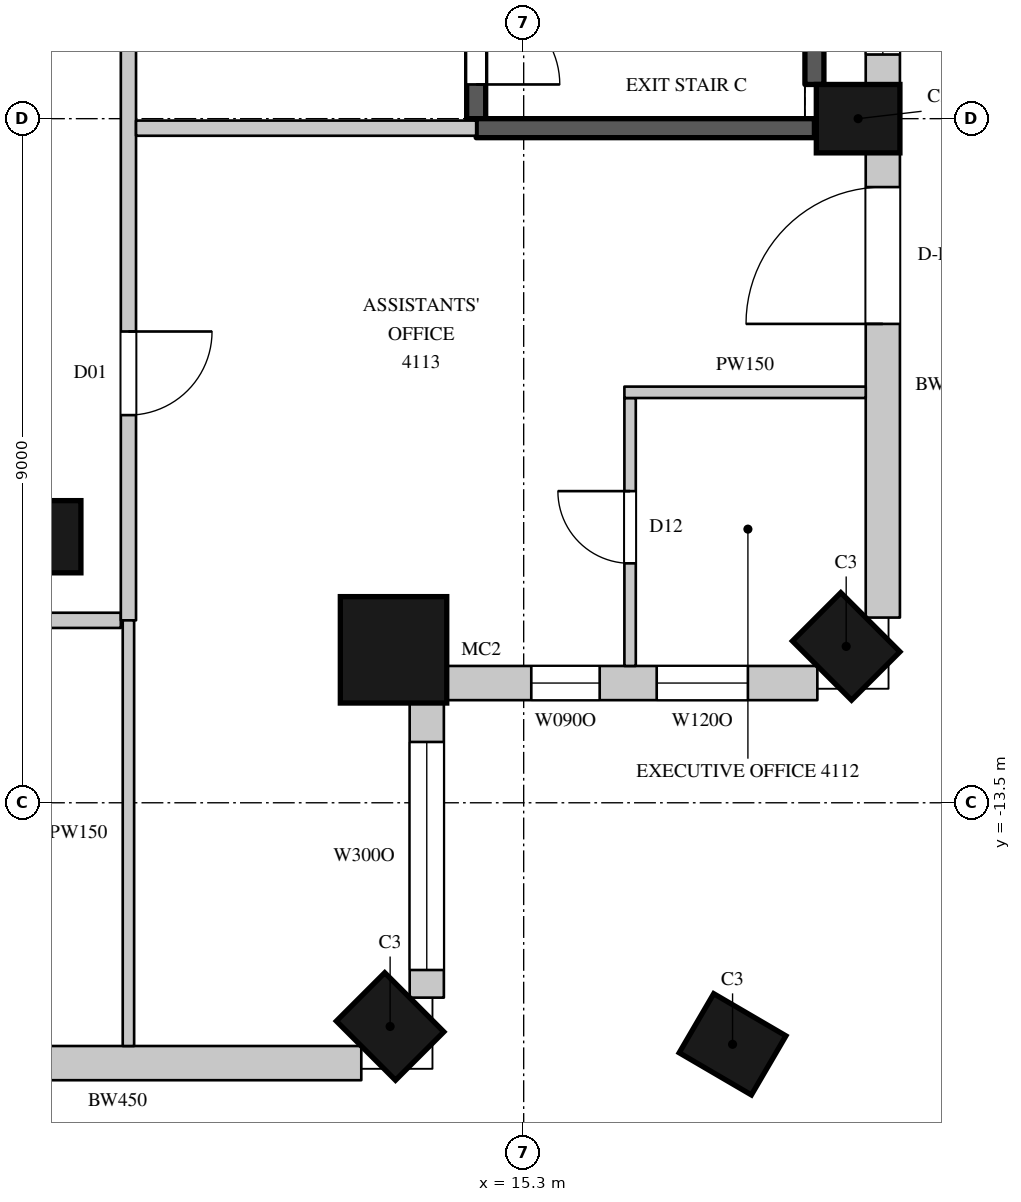
"""IFC4 building model, lengths in metres.
Left out: names, types, materials, properties, quantities, classifications, styles, units other than length and angle.
Written with IfcOpenShell. Run it as: python <this file> out.ifc"""

import sys

from ifc_helpers import new_model, si_unit, direction, frame, frame_2d, origin, origin_2d, place, context, subcontext, project, spatial, rectangle, circle, extrude, element, fill, save


model = new_model("IFC4")
c1 = context("Model", 3, precision=1e-05, world=origin(), true_north=direction((0.0, 1.0)))
c2 = subcontext(c1, "Body", "Model", "MODEL_VIEW")
j1 = project(units=[si_unit("LENGTHUNIT", "METRE"), si_unit("PLANEANGLEUNIT", "RADIAN")], contexts=[c1])
p1 = place(None, origin())
s1 = spatial("IfcSite", under=j1, at=p1, CompositionType="ELEMENT")
p2 = place(p1, origin())
s2 = spatial("IfcBuilding", under=s1, at=p2, CompositionType="ELEMENT")
p3 = place(p2, frame((0.0, 0.0, 189.2)))
s3 = spatial("IfcBuildingStorey", under=s2, at=p3, CompositionType="ELEMENT", Elevation=189.2)
p4 = place(p3, frame((13.543, -16.443, 0.0), z_axis=(0.0, 0.0, 1.0), x_axis=(0.707106781187, 0.707106781187, 0.0)))
e1 = element("IfcColumn", 1, at=p4, inside=s3, PredefinedType="COLUMN", context=c2, shape_type="SweptSolid", body=[
    extrude(rectangle(XDim=0.9, YDim=1.1, at=origin_2d()), origin(), (0.0, 0.0, 1.0), 4.1),
])
p5 = place(p3, frame((13.588, -11.488, 0.0), z_axis=(0.0, 0.0, 1.0), x_axis=(1.0, 0.0, 0.0)))
e2 = element("IfcColumn", 2, at=p5, inside=s3, PredefinedType="COLUMN", context=c2, shape_type="SweptSolid", body=[
    extrude(circle(Radius=0.7, at=origin_2d()), origin(), (0.0, 0.0, 1.0), 4.1),
])
for number, where, z_axis, x_axis in (
    (3, (19.543, -11.443, 0.0), (0.0, 0.0, 1.0), (0.707, 0.707, 0.0)),
    (4, (19.7, -4.5, 0.0), (0.0, 0.0, 1.0), (0.0, 1.0, 0.0)),
    (5, (18.048, -16.677, 0.0), (0.0, 0.0, 1.0), (0.504, 0.863, 0.0)),
):
    element("IfcColumn", number, at=place(p3, frame(where, z_axis=z_axis, x_axis=x_axis)), inside=s3, PredefinedType="COLUMN", context=c2, shape_type="SweptSolid", body=[
        extrude(rectangle(XDim=0.9, YDim=1.1, at=origin_2d()), origin(), (0.0, 0.0, 1.0), 4.1),
    ])
p6 = place(p3, frame((9.0, -10.0, 0.0), z_axis=(0.0, 0.0, 1.0), x_axis=(1.0, 0.0, 0.0)))
e6 = element("IfcColumn", 6, at=p6, inside=s3, PredefinedType="COLUMN", context=c2, shape_type="SweptSolid", body=[
    extrude(circle(Radius=0.475, at=origin_2d()), origin(), (0.0, 0.0, 1.0), 4.1),
])
p7 = place(p3, frame((6.75, -16.925, 0.0), z_axis=(0.0, 0.0, 1.0), x_axis=(1.0, 0.0, 0.0)))
e7 = element("IfcWall", 7, at=p7, inside=s3, PredefinedType="SOLIDWALL", context=c2, shape_type="SweptSolid", body=[
    extrude(rectangle(XDim=6.414, YDim=0.45, at=frame_2d((3.207, 0.0))), origin(), (0.0, 0.0, 1.0), 3.8),
])
p8 = place(p7, frame((0.525, 0.0, 0.0)))
e8 = element("IfcOpeningElement", 8, at=p8, cuts=e7, PredefinedType="OPENING", context=c2, shape_type="SweptSolid", body=[
    extrude(rectangle(XDim=1.8, YDim=2.4, at=frame_2d((0.9, 1.2))), frame((0.0, 0.235, 0.0), z_axis=(0.0, -1.0, 0.0), x_axis=(1.0, 0.0, 0.0)), (0.0, 0.0, 1.0), 0.47),
])
p9 = place(p3, frame((14.025, -16.064, 0.0), z_axis=(0.0, 0.0, 1.0), x_axis=(0.0, 1.0, 0.0)))
e9 = element("IfcWall", 9, at=p9, inside=s3, PredefinedType="SOLIDWALL", context=c2, shape_type="SweptSolid", body=[
    extrude(rectangle(XDim=3.909, YDim=0.45, at=frame_2d((1.955, 0.0))), origin(), (0.0, 0.0, 1.0), 3.8),
])
p10 = place(p9, frame((0.364, 0.0, 1.05)))
e10 = element("IfcOpeningElement", 10, at=p10, cuts=e9, PredefinedType="OPENING", context=c2, shape_type="SweptSolid", body=[
    extrude(rectangle(XDim=3.0, YDim=2.4, at=frame_2d((1.5, 1.2))), frame((0.0, 0.235, 0.0), z_axis=(0.0, -1.0, 0.0), x_axis=(1.0, 0.0, 0.0)), (0.0, 0.0, 1.0), 0.47),
])
p11 = place(p3, frame((14.255, -11.925, 0.0), z_axis=(0.0, 0.0, 1.0), x_axis=(1.0, 0.0, 0.0)))
e11 = element("IfcWall", 11, at=p11, inside=s3, PredefinedType="SOLIDWALL", context=c2, shape_type="SweptSolid", body=[
    extrude(rectangle(XDim=4.909, YDim=0.45, at=frame_2d((2.455, 0.0))), origin(), (0.0, 0.0, 1.0), 3.8),
])
p12 = place(p11, frame((1.146, 0.0, 1.05)))
e12 = element("IfcOpeningElement", 12, at=p12, cuts=e11, PredefinedType="OPENING", context=c2, shape_type="SweptSolid", body=[
    extrude(rectangle(XDim=0.9, YDim=2.4, at=frame_2d((0.45, 1.2))), frame((0.0, 0.235, 0.0), z_axis=(0.0, -1.0, 0.0), x_axis=(1.0, 0.0, 0.0)), (0.0, 0.0, 1.0), 0.47),
])
p13 = place(p11, frame((2.795, 0.0, 1.05)))
e13 = element("IfcOpeningElement", 13, at=p13, cuts=e11, PredefinedType="OPENING", context=c2, shape_type="SweptSolid", body=[
    extrude(rectangle(XDim=1.2, YDim=2.4, at=frame_2d((0.6, 1.2))), frame((0.0, 0.235, 0.0), z_axis=(0.0, -1.0, 0.0), x_axis=(1.0, 0.0, 0.0)), (0.0, 0.0, 1.0), 0.47),
])
p14 = place(p3, frame((20.025, -11.064, 0.0), z_axis=(0.0, 0.0, 1.0), x_axis=(0.0, 1.0, 0.0)))
e14 = element("IfcWall", 14, at=p14, inside=s3, PredefinedType="SOLIDWALL", context=c2, shape_type="SweptSolid", body=[
    extrude(rectangle(XDim=6.114, YDim=0.45, at=frame_2d((3.057, 0.0))), origin(), (0.0, 0.0, 1.0), 3.8),
])
p15 = place(p14, frame((3.864, 0.0, 0.0)))
e15 = element("IfcOpeningElement", 15, at=p15, cuts=e14, PredefinedType="OPENING", context=c2, shape_type="SweptSolid", body=[
    extrude(rectangle(XDim=1.8, YDim=2.4, at=frame_2d((0.9, 1.2))), frame((0.0, 0.235, 0.0), z_axis=(0.0, -1.0, 0.0), x_axis=(1.0, 0.0, 0.0)), (0.0, 0.0, 1.0), 0.47),
])
p16 = place(p3, frame((20.025, -4.05, 0.0), z_axis=(0.0, 0.0, 1.0), x_axis=(0.0, 1.0, 0.0)))
e16 = element("IfcWall", 16, at=p16, inside=s3, PredefinedType="SOLIDWALL", context=c2, shape_type="SweptSolid", body=[
    extrude(rectangle(XDim=8.439, YDim=0.45, at=frame_2d((4.219, 0.0))), origin(), (0.0, 0.0, 1.0), 3.8),
])
p17 = place(p16, frame((0.394, 0.0, 1.05)))
e17 = element("IfcOpeningElement", 17, at=p17, cuts=e16, PredefinedType="OPENING", context=c2, shape_type="SweptSolid", body=[
    extrude(rectangle(XDim=3.0, YDim=2.4, at=frame_2d((1.5, 1.2))), frame((0.0, 0.235, 0.0), z_axis=(0.0, -1.0, 0.0), x_axis=(1.0, 0.0, 0.0)), (0.0, 0.0, 1.0), 0.47),
])
p18 = place(p16, frame((5.082, 0.0, 1.05)))
e18 = element("IfcOpeningElement", 18, at=p18, cuts=e16, PredefinedType="OPENING", context=c2, shape_type="SweptSolid", body=[
    extrude(rectangle(XDim=3.0, YDim=2.4, at=frame_2d((1.5, 1.2))), frame((0.0, 0.235, 0.0), z_axis=(0.0, -1.0, 0.0), x_axis=(1.0, 0.0, 0.0)), (0.0, 0.0, 1.0), 0.47),
])
p19 = place(p3, frame((-10.9, -11.1, 0.0), z_axis=(0.0, 0.0, 1.0), x_axis=(1.0, 0.0, 0.0)))
e19 = element("IfcWall", 19, at=p19, inside=s3, PredefinedType="PARTITIONING", context=c2, shape_type="SweptSolid", body=[
    extrude(rectangle(XDim=20.9, YDim=0.2, at=frame_2d((10.45, 0.0))), origin(), (0.0, 0.0, 1.0), 3.8),
])
p20 = place(p19, frame((1.1, 0.0, 0.0)))
e20 = element("IfcOpeningElement", 20, at=p20, cuts=e19, PredefinedType="OPENING", context=c2, shape_type="SweptSolid", body=[
    extrude(rectangle(XDim=0.9, YDim=2.2, at=frame_2d((0.45, 1.1))), frame((0.0, 0.11, 0.0), z_axis=(0.0, -1.0, 0.0), x_axis=(1.0, 0.0, 0.0)), (0.0, 0.0, 1.0), 0.22),
])
p21 = place(p19, frame((4.9, 0.0, 0.0)))
e21 = element("IfcOpeningElement", 21, at=p21, cuts=e19, PredefinedType="OPENING", context=c2, shape_type="SweptSolid", body=[
    extrude(rectangle(XDim=0.9, YDim=2.2, at=frame_2d((0.45, 1.1))), frame((0.0, 0.11, 0.0), z_axis=(0.0, -1.0, 0.0), x_axis=(1.0, 0.0, 0.0)), (0.0, 0.0, 1.0), 0.22),
])
p22 = place(p19, frame((7.25, 0.0, 0.0)))
e22 = element("IfcOpeningElement", 22, at=p22, cuts=e19, PredefinedType="OPENING", context=c2, shape_type="SweptSolid", body=[
    extrude(rectangle(XDim=0.9, YDim=2.2, at=frame_2d((0.45, 1.1))), frame((0.0, 0.11, 0.0), z_axis=(0.0, -1.0, 0.0), x_axis=(1.0, 0.0, 0.0)), (0.0, 0.0, 1.0), 0.22),
])
p23 = place(p19, frame((9.95, 0.0, 0.0)))
e23 = element("IfcOpeningElement", 23, at=p23, cuts=e19, PredefinedType="OPENING", context=c2, shape_type="SweptSolid", body=[
    extrude(rectangle(XDim=1.1, YDim=2.4, at=frame_2d((0.55, 1.2))), frame((0.0, 0.11, 0.0), z_axis=(0.0, -1.0, 0.0), x_axis=(1.0, 0.0, 0.0)), (0.0, 0.0, 1.0), 0.22),
])
p24 = place(p19, frame((16.3, 0.0, 0.0)))
e24 = element("IfcOpeningElement", 24, at=p24, cuts=e19, PredefinedType="OPENING", context=c2, shape_type="SweptSolid", body=[
    extrude(rectangle(XDim=1.1, YDim=2.4, at=frame_2d((0.55, 1.2))), frame((0.0, 0.11, 0.0), z_axis=(0.0, -1.0, 0.0), x_axis=(1.0, 0.0, 0.0)), (0.0, 0.0, 1.0), 0.22),
])
p25 = place(p3, frame((10.1, -11.1, 0.0), z_axis=(0.0, 0.0, 1.0), x_axis=(0.0, 1.0, 0.0)))
e25 = element("IfcWall", 25, at=p25, inside=s3, PredefinedType="PARTITIONING", context=c2, shape_type="SweptSolid", body=[
    extrude(rectangle(XDim=23.2, YDim=0.2, at=frame_2d((11.6, 0.0))), origin(), (0.0, 0.0, 1.0), 3.8),
])
p26 = place(p25, frame((8.0, 0.0, 0.0)))
e26 = element("IfcOpeningElement", 26, at=p26, cuts=e25, PredefinedType="OPENING", context=c2, shape_type="SweptSolid", body=[
    extrude(rectangle(XDim=1.5, YDim=2.4, at=frame_2d((0.75, 1.2))), frame((0.0, 0.11, 0.0), z_axis=(0.0, -1.0, 0.0), x_axis=(1.0, 0.0, 0.0)), (0.0, 0.0, 1.0), 0.22),
])
p27 = place(p25, frame((18.95, 0.0, 0.0)))
e27 = element("IfcOpeningElement", 27, at=p27, cuts=e25, PredefinedType="OPENING", context=c2, shape_type="SweptSolid", body=[
    extrude(rectangle(XDim=1.1, YDim=2.4, at=frame_2d((0.55, 1.2))), frame((0.0, 0.11, 0.0), z_axis=(0.0, -1.0, 0.0), x_axis=(1.0, 0.0, 0.0)), (0.0, 0.0, 1.0), 0.22),
])
p28 = place(p25, frame((2.7, 0.0, 0.0)))
e28 = element("IfcOpeningElement", 28, at=p28, cuts=e25, PredefinedType="OPENING", context=c2, shape_type="SweptSolid", body=[
    extrude(rectangle(XDim=1.1, YDim=2.4, at=frame_2d((0.55, 1.2))), frame((0.0, 0.11, 0.0), z_axis=(0.0, -1.0, 0.0), x_axis=(1.0, 0.0, 0.0)), (0.0, 0.0, 1.0), 0.22),
])
p29 = place(p3, frame((10.2, -4.625, 0.0), z_axis=(0.0, 0.0, 1.0), x_axis=(1.0, 0.0, 0.0)))
e29 = element("IfcWall", 29, at=p29, inside=s3, PredefinedType="PARTITIONING", context=c2, shape_type="SweptSolid", body=[
    extrude(rectangle(XDim=4.475, YDim=0.2, at=frame_2d((2.238, 0.0))), origin(), (0.0, 0.0, 1.0), 3.8),
])
p30 = place(p3, frame((10.1, -16.7, 0.0), z_axis=(0.0, 0.0, 1.0), x_axis=(0.0, 1.0, 0.0)))
e30 = element("IfcWall", 30, at=p30, inside=s3, PredefinedType="PARTITIONING", context=c2, shape_type="SweptSolid", body=[
    extrude(rectangle(XDim=5.6, YDim=0.15, at=frame_2d((2.8, 0.0))), origin(), (0.0, 0.0, 1.0), 3.8),
])
p31 = place(p3, frame((16.7, -11.7, 0.0), z_axis=(0.0, 0.0, 1.0), x_axis=(0.0, 1.0, 0.0)))
e31 = element("IfcWall", 31, at=p31, inside=s3, PredefinedType="PARTITIONING", context=c2, shape_type="SweptSolid", body=[
    extrude(rectangle(XDim=3.525, YDim=0.15, at=frame_2d((1.762, 0.0))), origin(), (0.0, 0.0, 1.0), 3.8),
])
p32 = place(p31, frame((1.35, 0.0, 0.0)))
e32 = element("IfcOpeningElement", 32, at=p32, cuts=e31, PredefinedType="OPENING", context=c2, shape_type="SweptSolid", body=[
    extrude(rectangle(XDim=0.95, YDim=2.2, at=frame_2d((0.475, 1.1))), frame((0.0, 0.085, 0.0), z_axis=(0.0, -1.0, 0.0), x_axis=(1.0, 0.0, 0.0)), (0.0, 0.0, 1.0), 0.17),
])
p33 = place(p3, frame((16.625, -8.1, 0.0), z_axis=(0.0, 0.0, 1.0), x_axis=(1.0, 0.0, 0.0)))
e33 = element("IfcWall", 33, at=p33, inside=s3, PredefinedType="PARTITIONING", context=c2, shape_type="SweptSolid", body=[
    extrude(rectangle(XDim=3.175, YDim=0.15, at=frame_2d((1.587, 0.0))), origin(), (0.0, 0.0, 1.0), 3.15),
])
p34 = place(p3, frame((14.675, -4.5, 0.0), z_axis=(0.0, 0.0, 1.0), x_axis=(0.0, 1.0, 0.0)))
e34 = element("IfcWall", 34, at=p34, inside=s3, PredefinedType="SHEAR", context=c2, shape_type="SweptSolid", body=[
    extrude(rectangle(XDim=9.0, YDim=0.25, at=frame_2d((4.5, 0.0))), origin(), (0.0, 0.0, 1.0), 3.8),
])
p35 = place(p34, frame((0.45, 0.0, 0.0)))
e35 = element("IfcOpeningElement", 35, at=p35, cuts=e34, PredefinedType="OPENING", context=c2, shape_type="SweptSolid", body=[
    extrude(rectangle(XDim=1.1, YDim=2.2, at=frame_2d((0.55, 1.1))), frame((0.0, 0.135, 0.0), z_axis=(0.0, -1.0, 0.0), x_axis=(1.0, 0.0, 0.0)), (0.0, 0.0, 1.0), 0.27),
])
p36 = place(p3, frame((14.675, -4.625, 0.0), z_axis=(0.0, 0.0, 1.0), x_axis=(1.0, 0.0, 0.0)))
e36 = element("IfcWall", 36, at=p36, inside=s3, PredefinedType="SHEAR", context=c2, shape_type="SweptSolid", body=[
    extrude(rectangle(XDim=4.45, YDim=0.25, at=frame_2d((2.225, 0.0))), origin(), (0.0, 0.0, 1.0), 3.8),
])
p37 = place(p3, frame((19.125, -4.05, 0.0), z_axis=(0.0, 0.0, 1.0), x_axis=(0.0, 1.0, 0.0)))
e37 = element("IfcWall", 37, at=p37, inside=s3, PredefinedType="SHEAR", context=c2, shape_type="SweptSolid", body=[
    extrude(rectangle(XDim=8.477, YDim=0.25, at=frame_2d((4.238, 0.0))), origin(), (0.0, 0.0, 1.0), 3.8),
])
p38 = place(p10, origin())
e38 = element("IfcWindow", 38, at=p38, inside=s3, PartitioningType="SINGLE_PANEL", PredefinedType="WINDOW", context=c2, shape_type="SweptSolid", body=[
    extrude(rectangle(XDim=3.0, YDim=2.4, at=frame_2d((1.5, 1.2))), frame((0.0, 0.135, 0.0), z_axis=(0.0, -1.0, 0.0), x_axis=(1.0, 0.0, 0.0)), (0.0, 0.0, 1.0), 0.06),
])
fill(e10, e38)
p39 = place(p15, origin())
e39 = element("IfcDoor", 39, at=p39, inside=s3, OperationType="SLIDING_TO_LEFT", PredefinedType="DOOR", context=c2, shape_type="SweptSolid", body=[
    extrude(rectangle(XDim=1.8, YDim=2.4, at=frame_2d((0.9, 1.2))), frame((0.0, 0.13, 0.0), z_axis=(0.0, -1.0, 0.0), x_axis=(1.0, 0.0, 0.0)), (0.0, 0.0, 1.0), 0.05),
])
fill(e15, e39)
p40 = place(p17, origin())
e40 = element("IfcWindow", 40, at=p40, inside=s3, PartitioningType="SINGLE_PANEL", PredefinedType="WINDOW", context=c2, shape_type="SweptSolid", body=[
    extrude(rectangle(XDim=3.0, YDim=2.4, at=frame_2d((1.5, 1.2))), frame((0.0, 0.135, 0.0), z_axis=(0.0, -1.0, 0.0), x_axis=(1.0, 0.0, 0.0)), (0.0, 0.0, 1.0), 0.06),
])
fill(e17, e40)
p41 = place(p28, origin())
e41 = element("IfcDoor", 41, at=p41, inside=s3, OperationType="SINGLE_SWING_LEFT", PredefinedType="DOOR", context=c2, shape_type="SweptSolid", body=[
    extrude(rectangle(XDim=1.1, YDim=2.4, at=frame_2d((0.55, 1.2))), frame((0.0, 0.025, 0.0), z_axis=(0.0, -1.0, 0.0), x_axis=(1.0, 0.0, 0.0)), (0.0, 0.0, 1.0), 0.05),
])
fill(e28, e41)
p42 = place(p32, origin())
e42 = element("IfcDoor", 42, at=p42, inside=s3, OperationType="SINGLE_SWING_RIGHT", PredefinedType="DOOR", context=c2, shape_type="SweptSolid", body=[
    extrude(rectangle(XDim=0.95, YDim=2.2, at=frame_2d((0.475, 1.1))), frame((0.0, 0.025, 0.0), z_axis=(0.0, -1.0, 0.0), x_axis=(1.0, 0.0, 0.0)), (0.0, 0.0, 1.0), 0.05),
])
fill(e32, e42)
p43 = place(p35, origin())
e43 = element("IfcDoor", 43, at=p43, inside=s3, OperationType="SINGLE_SWING_RIGHT", PredefinedType="DOOR", context=c2, shape_type="SweptSolid", body=[
    extrude(rectangle(XDim=1.1, YDim=2.2, at=frame_2d((0.55, 1.1))), frame((0.0, 0.025, 0.0), z_axis=(0.0, -1.0, 0.0), x_axis=(1.0, 0.0, 0.0)), (0.0, 0.0, 1.0), 0.05),
])
fill(e35, e43)
p44 = place(p12, origin())
e44 = element("IfcWindow", 44, at=p44, inside=s3, PartitioningType="SINGLE_PANEL", PredefinedType="WINDOW", context=c2, shape_type="SweptSolid", body=[
    extrude(rectangle(XDim=0.9, YDim=2.4, at=frame_2d((0.45, 1.2))), frame((0.0, 0.135, 0.0), z_axis=(0.0, -1.0, 0.0), x_axis=(1.0, 0.0, 0.0)), (0.0, 0.0, 1.0), 0.06),
])
fill(e12, e44)
p45 = place(p13, origin())
e45 = element("IfcWindow", 45, at=p45, inside=s3, PartitioningType="SINGLE_PANEL", PredefinedType="WINDOW", context=c2, shape_type="SweptSolid", body=[
    extrude(rectangle(XDim=1.2, YDim=2.4, at=frame_2d((0.6, 1.2))), frame((0.0, 0.135, 0.0), z_axis=(0.0, -1.0, 0.0), x_axis=(1.0, 0.0, 0.0)), (0.0, 0.0, 1.0), 0.06),
])
fill(e13, e45)
save(model, sys.argv[1])
